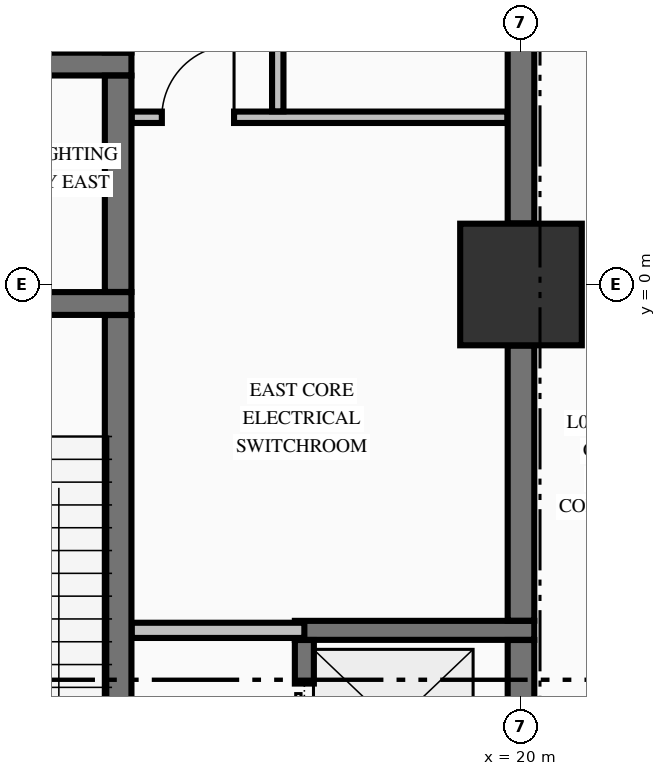
"""IFC4 building model, lengths in metres.
Left out: names, types, materials, properties, quantities, classifications, styles, units other than length and angle.
Written with IfcOpenShell. Run it as: python <this file> out.ifc"""

import sys

from ifc_helpers import new_model, si_unit, direction, frame, frame_2d, origin, origin_2d, place, context, subcontext, project, spatial, rectangle, extrude, element, fill, save


model = new_model("IFC4")
c1 = context("Model", 3, precision=1e-05, world=origin(), true_north=direction((0.0, 1.0)))
c2 = subcontext(c1, "Body", "Model", "MODEL_VIEW")
j1 = project(units=[si_unit("LENGTHUNIT", "METRE"), si_unit("PLANEANGLEUNIT", "RADIAN")], contexts=[c1])
p1 = place(None, origin())
s1 = spatial("IfcSite", under=j1, at=p1, CompositionType="ELEMENT")
p2 = place(p1, origin())
s2 = spatial("IfcBuilding", under=s1, at=p2, CompositionType="ELEMENT")
p3 = place(p2, origin())
s3 = spatial("IfcBuildingStorey", under=s2, at=p3, CompositionType="ELEMENT", Elevation=0.0)
p4 = place(p3, frame((20.0, 0.0, 0.0), z_axis=(0.0, 0.0, 1.0), x_axis=(1.0, 0.0, 0.0)))
e1 = element("IfcColumn", 1, at=p4, inside=s3, PredefinedType="COLUMN", context=c2, shape_type="SweptSolid", body=[
    extrude(rectangle(XDim=1.6, YDim=1.6, at=origin_2d()), origin(), (0.0, 0.0, 1.0), 5.09),
])
p5 = place(p3, frame((17.025, -4.55, 0.0), z_axis=(0.0, 0.0, 1.0), x_axis=(1.0, 0.0, 0.0)))
e2 = element("IfcWall", 2, at=p5, inside=s3, PredefinedType="SOLIDWALL", context=c2, shape_type="SweptSolid", body=[
    extrude(rectangle(XDim=3.15, YDim=0.25, at=frame_2d((1.575, 0.0))), origin(), (0.0, 0.0, 1.0), 5.09),
])
p6 = place(p3, frame((11.804, -0.25, 0.0), z_axis=(0.0, 0.0, 1.0), x_axis=(1.0, 0.0, 0.0)))
e3 = element("IfcWall", 3, at=p6, inside=s3, PredefinedType="SHEAR", context=c2, shape_type="SweptSolid", body=[
    extrude(rectangle(XDim=3.071, YDim=0.3, at=frame_2d((1.536, 0.0))), origin(), (0.0, 0.0, 1.0), 5.09),
])
p7 = place(p6, frame((0.796, 0.0, 0.0)))
e4 = element("IfcOpeningElement", 4, at=p7, cuts=e3, PredefinedType="OPENING", context=c2, shape_type="SweptSolid", body=[
    extrude(rectangle(XDim=1.1, YDim=2.15, at=frame_2d((0.55, 1.075))), frame((0.0, 0.16, 0.0), z_axis=(0.0, -1.0, 0.0), x_axis=(1.0, 0.0, 0.0)), (0.0, 0.0, 1.0), 0.32),
])
p8 = place(p3, frame((10.85, 2.9, 0.0), z_axis=(0.0, 0.0, 1.0), x_axis=(1.0, 0.0, 0.0)))
e5 = element("IfcWall", 5, at=p8, inside=s3, PredefinedType="SHEAR", context=c2, shape_type="SweptSolid", body=[
    extrude(rectangle(XDim=4.025, YDim=0.3, at=frame_2d((2.012, 0.0))), origin(), (0.0, 0.0, 1.0), 5.09),
])
p9 = place(p8, frame((0.85, 0.0, 0.0)))
e6 = element("IfcOpeningElement", 6, at=p9, cuts=e5, PredefinedType="OPENING", context=c2, shape_type="SweptSolid", body=[
    extrude(rectangle(XDim=1.1, YDim=2.2, at=frame_2d((0.55, 1.1))), frame((0.0, 0.16, 0.0), z_axis=(0.0, -1.0, 0.0), x_axis=(1.0, 0.0, 0.0)), (0.0, 0.0, 1.0), 0.32),
])
p10 = place(p3, frame((14.878, -4.55, 0.0), z_axis=(0.0, 0.0, 1.0), x_axis=(1.0, 0.0, 0.0)))
e7 = element("IfcWall", 7, at=p10, inside=s3, PredefinedType="PARTITIONING", context=c2, shape_type="SweptSolid", body=[
    extrude(rectangle(XDim=2.272, YDim=0.2, at=frame_2d((1.136, 0.0))), origin(), (0.0, 0.0, 1.0), 5.09),
])
p11 = place(p3, frame((14.878, 2.2, 0.0), z_axis=(0.0, 0.0, 1.0), x_axis=(1.0, 0.0, 0.0)))
e8 = element("IfcWall", 8, at=p11, inside=s3, PredefinedType="PARTITIONING", context=c2, shape_type="SweptSolid", body=[
    extrude(rectangle(XDim=4.944, YDim=0.15, at=frame_2d((2.472, 0.0))), origin(), (0.0, 0.0, 1.0), 5.09),
])
p12 = place(p11, frame((0.397, 0.0, 0.0)))
e9 = element("IfcOpeningElement", 9, at=p12, cuts=e8, PredefinedType="OPENING", context=c2, shape_type="SweptSolid", body=[
    extrude(rectangle(XDim=0.95, YDim=2.15, at=frame_2d((0.475, 1.075))), frame((0.0, 0.085, 0.0), z_axis=(0.0, -1.0, 0.0), x_axis=(1.0, 0.0, 0.0)), (0.0, 0.0, 1.0), 0.17),
])
p13 = place(p3, frame((14.7, -9.773, 0.0), z_axis=(0.0, 0.0, 1.0), x_axis=(0.0, 1.0, 0.0)))
e10 = element("IfcWall", 10, at=p13, inside=s3, PredefinedType="SHEAR", context=c2, shape_type="SweptSolid", body=[
    extrude(rectangle(XDim=9.371, YDim=0.35, at=frame_2d((4.686, 0.0))), origin(), (0.0, 0.0, 1.0), 5.09),
])
p14 = place(p3, frame((14.7, -0.098, 0.0), z_axis=(0.0, 0.0, 1.0), x_axis=(0.0, 1.0, 0.0)))
e11 = element("IfcWall", 11, at=p14, inside=s3, PredefinedType="SHEAR", context=c2, shape_type="SweptSolid", body=[
    extrude(rectangle(XDim=2.846, YDim=0.35, at=frame_2d((1.423, 0.0))), origin(), (0.0, 0.0, 1.0), 5.09),
])
p15 = place(p3, frame((14.7, 3.052, 0.0), z_axis=(0.0, 0.0, 1.0), x_axis=(0.0, 1.0, 0.0)))
e12 = element("IfcWall", 12, at=p15, inside=s3, PredefinedType="SHEAR", context=c2, shape_type="SweptSolid", body=[
    extrude(rectangle(XDim=2.496, YDim=0.35, at=frame_2d((1.248, 0.0))), origin(), (0.0, 0.0, 1.0), 5.09),
])
p16 = place(p3, frame((17.15, -6.923, 0.0), z_axis=(0.0, 0.0, 1.0), x_axis=(0.0, 1.0, 0.0)))
e13 = element("IfcWall", 13, at=p16, inside=s3, PredefinedType="SOLIDWALL", context=c2, shape_type="SweptSolid", body=[
    extrude(rectangle(XDim=2.246, YDim=0.25, at=frame_2d((1.123, 0.0))), origin(), (0.0, 0.0, 1.0), 5.09),
])
p17 = place(p16, frame((0.573, 0.0, 0.0)))
e14 = element("IfcOpeningElement", 14, at=p17, cuts=e13, PredefinedType="OPENING", context=c2, shape_type="SweptSolid", body=[
    extrude(rectangle(XDim=1.1, YDim=2.2, at=frame_2d((0.55, 1.1))), frame((0.0, 0.135, 0.0), z_axis=(0.0, -1.0, 0.0), x_axis=(1.0, 0.0, 0.0)), (0.0, 0.0, 1.0), 0.27),
])
p18 = place(p3, frame((20.0, -6.923, 0.0), z_axis=(0.0, 0.0, 1.0), x_axis=(0.0, 1.0, 0.0)))
e15 = element("IfcWall", 15, at=p18, inside=s3, PredefinedType="SHEAR", context=c2, shape_type="SweptSolid", body=[
    extrude(rectangle(XDim=2.246, YDim=0.35, at=frame_2d((1.123, 0.0))), origin(), (0.0, 0.0, 1.0), 5.09),
])
p19 = place(p3, frame((20.0, -4.423, 0.0), z_axis=(0.0, 0.0, 1.0), x_axis=(0.0, 1.0, 0.0)))
e16 = element("IfcWall", 16, at=p19, inside=s3, PredefinedType="SHEAR", context=c2, shape_type="SweptSolid", body=[
    extrude(rectangle(XDim=3.619, YDim=0.35, at=frame_2d((1.81, 0.0))), origin(), (0.0, 0.0, 1.0), 5.09),
])
p20 = place(p3, frame((20.0, 0.804, 0.0), z_axis=(0.0, 0.0, 1.0), x_axis=(0.0, 1.0, 0.0)))
e17 = element("IfcWall", 17, at=p20, inside=s3, PredefinedType="SHEAR", context=c2, shape_type="SweptSolid", body=[
    extrude(rectangle(XDim=7.392, YDim=0.35, at=frame_2d((3.696, 0.0))), origin(), (0.0, 0.0, 1.0), 5.09),
])
p21 = place(p3, frame((16.8, 2.278, 0.0), z_axis=(0.0, 0.0, 1.0), x_axis=(0.0, 1.0, 0.0)))
e18 = element("IfcWall", 18, at=p21, inside=s3, PredefinedType="PARTITIONING", context=c2, shape_type="SweptSolid", body=[
    extrude(rectangle(XDim=4.144, YDim=0.15, at=frame_2d((2.072, 0.0))), origin(), (0.0, 0.0, 1.0), 5.09),
])
p22 = place(p17, origin())
e19 = element("IfcDoor", 19, at=p22, inside=s3, OperationType="SLIDING_TO_RIGHT", PredefinedType="DOOR", context=c2, shape_type="SweptSolid", body=[
    extrude(rectangle(XDim=1.1, YDim=2.2, at=frame_2d((0.55, 1.1))), frame((0.0, 0.025, 0.0), z_axis=(0.0, -1.0, 0.0), x_axis=(1.0, 0.0, 0.0)), (0.0, 0.0, 1.0), 0.05),
])
fill(e14, e19)
p23 = place(p12, origin())
e20 = element("IfcDoor", 20, at=p23, inside=s3, OperationType="SINGLE_SWING_RIGHT", PredefinedType="DOOR", context=c2, shape_type="SweptSolid", body=[
    extrude(rectangle(XDim=0.95, YDim=2.15, at=frame_2d((0.475, 1.075))), frame((0.0, 0.025, 0.0), z_axis=(0.0, -1.0, 0.0), x_axis=(1.0, 0.0, 0.0)), (0.0, 0.0, 1.0), 0.05),
])
fill(e9, e20)
save(model, sys.argv[1])
